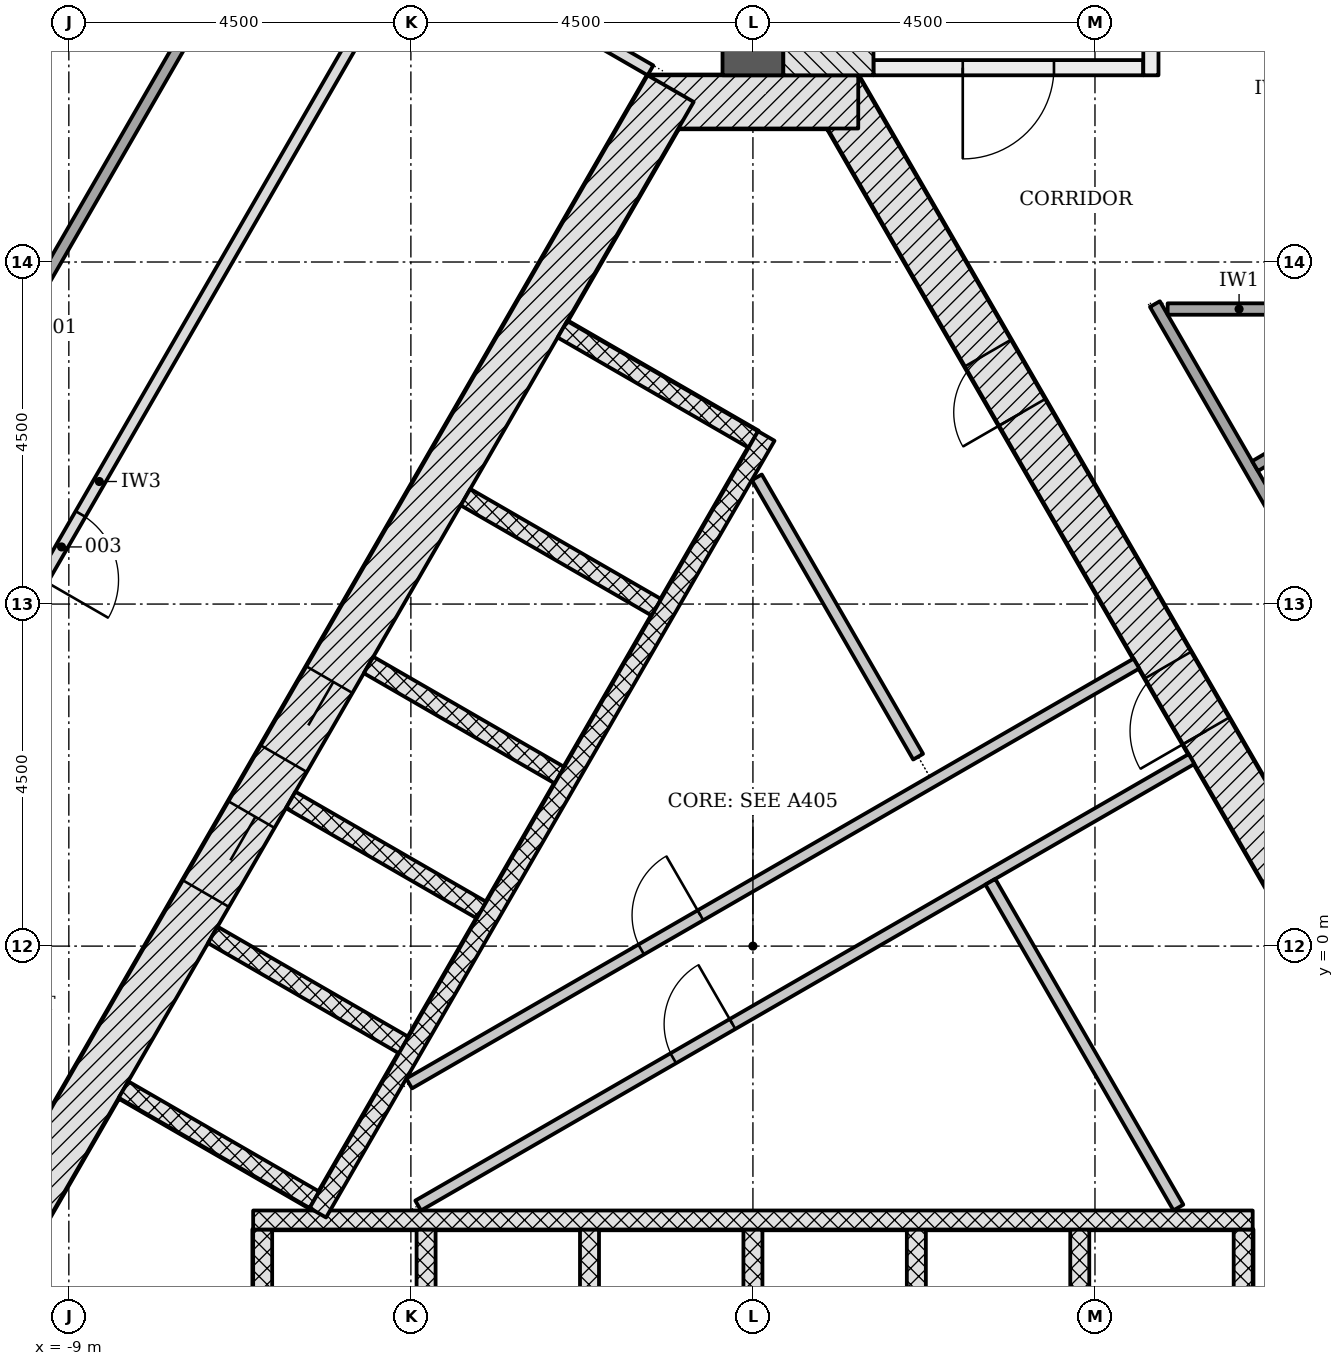
"""IFC4 building model, lengths in metres.
Left out: names, types, materials, properties, quantities, classifications, styles, units other than length and angle.
Written with IfcOpenShell. Run it as: python <this file> out.ifc"""

import sys

from ifc_helpers import new_model, si_unit, direction, frame, frame_2d, origin, place, context, subcontext, project, spatial, rectangle, extrude, element, fill, save


model = new_model("IFC4")
c1 = context("Model", 3, precision=1e-05, world=origin(), true_north=direction((0.0, 1.0)))
c2 = subcontext(c1, "Body", "Model", "MODEL_VIEW")
j1 = project(units=[si_unit("LENGTHUNIT", "METRE"), si_unit("PLANEANGLEUNIT", "RADIAN")], contexts=[c1])
p1 = place(None, origin())
s1 = spatial("IfcSite", under=j1, at=p1, CompositionType="ELEMENT")
p2 = place(p1, origin())
s2 = spatial("IfcBuilding", under=s1, at=p2, CompositionType="ELEMENT")
p3 = place(p2, frame((0.0, 0.0, 91.5)))
s3 = spatial("IfcBuildingStorey", under=s2, at=p3, CompositionType="ELEMENT", Elevation=91.5)
p4 = place(p3, frame((10.311, -4.703, -0.2), z_axis=(0.0, 0.0, 1.0), x_axis=(-0.500001446645, 0.866024568562, 0.0)))
e1 = element("IfcWall", 1, at=p4, inside=s3, PredefinedType="SHEAR", context=c2, shape_type="SweptSolid", body=[
    extrude(rectangle(XDim=18.458, YDim=0.7, at=frame_2d((9.229, 0.0))), origin(), (0.0, 0.0, 1.0), 3.6),
])
p5 = place(p4, frame((8.7, 0.0, 0.2)))
e2 = element("IfcOpeningElement", 2, at=p5, cuts=e1, PredefinedType="OPENING", context=c2, shape_type="SweptSolid", body=[
    extrude(rectangle(XDim=1.0, YDim=2.1, at=frame_2d((0.5, 1.05))), frame((0.0, 0.36, 0.0), z_axis=(0.0, -1.0, 0.0), x_axis=(1.0, 0.0, 0.0)), (0.0, 0.0, 1.0), 0.72),
])
p6 = place(p4, frame((3.99, 0.0, 0.2)))
e3 = element("IfcOpeningElement", 3, at=p6, cuts=e1, PredefinedType="OPENING", context=c2, shape_type="SweptSolid", body=[
    extrude(rectangle(XDim=0.9, YDim=2.1, at=frame_2d((0.45, 1.05))), frame((0.0, 0.36, 0.0), z_axis=(0.0, -1.0, 0.0), x_axis=(1.0, 0.0, 0.0)), (0.0, 0.0, 1.0), 0.72),
])
p7 = place(p4, frame((13.539, 0.0, 0.2)))
e4 = element("IfcOpeningElement", 4, at=p7, cuts=e1, PredefinedType="OPENING", context=c2, shape_type="SweptSolid", body=[
    extrude(rectangle(XDim=0.9, YDim=2.1, at=frame_2d((0.45, 1.05))), frame((0.0, 0.36, 0.0), z_axis=(0.0, -1.0, 0.0), x_axis=(1.0, 0.0, 0.0)), (0.0, 0.0, 1.0), 0.72),
])
p8 = place(p3, frame((1.386, 11.106, -0.2), z_axis=(0.0, 0.0, 1.0), x_axis=(-1.0, 0.0, 0.0)))
e5 = element("IfcWall", 5, at=p8, inside=s3, PredefinedType="SHEAR", context=c2, shape_type="SweptSolid", body=[
    extrude(rectangle(XDim=2.771, YDim=0.7, at=frame_2d((1.386, 0.0))), origin(), (0.0, 0.0, 1.0), 3.6),
])
p9 = place(p3, frame((-1.083, 11.281, -0.2), z_axis=(0.0, 0.0, 1.0), x_axis=(-0.500001446645, -0.866024568562, 0.0)))
e6 = element("IfcWall", 6, at=p9, inside=s3, PredefinedType="SHEAR", context=c2, shape_type="SweptSolid", body=[
    extrude(rectangle(XDim=18.458, YDim=0.7, at=frame_2d((9.229, 0.0))), origin(), (0.0, 0.0, 1.0), 3.6),
])
p10 = place(p9, frame((8.979, 0.0, 0.2)))
e7 = element("IfcOpeningElement", 7, at=p10, cuts=e6, PredefinedType="OPENING", context=c2, shape_type="SweptSolid", body=[
    extrude(rectangle(XDim=1.2, YDim=2.1, at=frame_2d((0.6, 1.05))), frame((0.0, 0.36, 0.0), z_axis=(0.0, -1.0, 0.0), x_axis=(1.0, 0.0, 0.0)), (0.0, 0.0, 1.0), 0.72),
])
p11 = place(p9, frame((11.029, 0.0, 0.2)))
e8 = element("IfcOpeningElement", 8, at=p11, cuts=e6, PredefinedType="OPENING", context=c2, shape_type="SweptSolid", body=[
    extrude(rectangle(XDim=1.2, YDim=2.1, at=frame_2d((0.6, 1.05))), frame((0.0, 0.36, 0.0), z_axis=(0.0, -1.0, 0.0), x_axis=(1.0, 0.0, 0.0)), (0.0, 0.0, 1.0), 0.72),
])
p12 = place(p3, frame((-10.311, -4.353, -0.2), z_axis=(0.0, 0.0, 1.0), x_axis=(0.500042739161, -0.866000726912, 0.0)))
e9 = element("IfcWall", 9, at=p12, inside=s3, PredefinedType="SHEAR", context=c2, shape_type="SweptSolid", body=[
    extrude(rectangle(XDim=2.771, YDim=0.7, at=frame_2d((1.386, 0.0))), origin(), (0.0, 0.0, 1.0), 3.6),
])
p13 = place(p3, frame((0.0, 11.456, -0.2), z_axis=(0.0, 0.0, 1.0), x_axis=(0.0, 1.0, 0.0)))
e10 = element("IfcWall", 10, at=p13, inside=s3, PredefinedType="SHEAR", context=c2, shape_type="SweptSolid", body=[
    extrude(rectangle(XDim=12.678, YDim=0.8, at=frame_2d((6.339, 0.0))), origin(), (0.0, 0.0, 1.0), 3.6),
])
for number, where, z_axis, x_axis in (
    (11, (-6.45, -6.228, -0.2), (0.0, 0.0, 1.0), (0.0, 1.0, 0.0)),
    (12, (-4.3, -6.228, -0.2), (0.0, 0.0, 1.0), (0.0, 1.0, 0.0)),
    (13, (-2.15, -6.228, -0.2), (0.0, 0.0, 1.0), (0.0, 1.0, 0.0)),
    (14, (0.0, -6.228, -0.2), (0.0, 0.0, 1.0), (0.0, 1.0, 0.0)),
    (15, (2.15, -6.228, -0.2), (0.0, 0.0, 1.0), (0.0, 1.0, 0.0)),
    (16, (4.3, -6.228, -0.2), (0.0, 0.0, 1.0), (0.0, 1.0, 0.0)),
    (17, (6.45, -6.228, -0.2), (0.0, 0.0, 1.0), (0.0, 1.0, 0.0)),
):
    element("IfcWall", number, at=place(p3, frame(where, z_axis=z_axis, x_axis=x_axis)), inside=s3, PredefinedType="PARTITIONING", context=c2, shape_type="SweptSolid", body=[
        extrude(rectangle(XDim=2.5, YDim=0.25, at=frame_2d((1.25, 0.0))), origin(), (0.0, 0.0, 1.0), 3.6),
    ])
p14 = place(p3, frame((-6.575, -3.603, 0.0), z_axis=(0.0, 0.0, 1.0), x_axis=(1.0, 0.0, 0.0)))
e18 = element("IfcWall", 18, at=p14, inside=s3, PredefinedType="PARTITIONING", context=c2, shape_type="SweptSolid", body=[
    extrude(rectangle(XDim=13.15, YDim=0.25, at=frame_2d((6.575, 0.0))), origin(), (0.0, 0.0, 1.0), 3.4),
])
p15 = place(p3, frame((-2.506, 8.115, -0.2), z_axis=(0.0, 0.0, 1.0), x_axis=(0.865996321171, -0.50005036918, 0.0)))
e19 = element("IfcWall", 19, at=p15, inside=s3, PredefinedType="PARTITIONING", context=c2, shape_type="SweptSolid", body=[
    extrude(rectangle(XDim=2.9, YDim=0.25, at=frame_2d((1.45, 0.0))), origin(), (0.0, 0.0, 1.0), 3.6),
])
for number, where, z_axis, x_axis in (
    (20, (-3.781, 5.907, -0.2), (0.0, 0.0, 1.0), (0.866, -0.5, 0.0)),
    (21, (-5.056, 3.699, -0.2), (0.0, 0.0, 1.0), (0.866, -0.5, 0.0)),
    (22, (-6.081, 1.923, -0.2), (0.0, 0.0, 1.0), (0.866, -0.5, 0.0)),
    (23, (-7.106, 0.148, -0.2), (0.0, 0.0, 1.0), (0.866, -0.5, 0.0)),
    (24, (-8.281, -1.887, -0.2), (0.0, 0.0, 1.0), (0.866, -0.5, 0.0)),
):
    element("IfcWall", number, at=place(p3, frame(where, z_axis=z_axis, x_axis=x_axis)), inside=s3, PredefinedType="PARTITIONING", context=c2, shape_type="SweptSolid", body=[
        extrude(rectangle(XDim=2.9, YDim=0.25, at=frame_2d((1.45, 0.0))), origin(), (0.0, 0.0, 1.0), 3.6),
    ])
p16 = place(p3, frame((0.176, 6.711, 0.0), z_axis=(0.0, 0.0, 1.0), x_axis=(-0.500004227369, -0.866022963098, 0.0)))
e25 = element("IfcWall", 25, at=p16, inside=s3, PredefinedType="PARTITIONING", context=c2, shape_type="SweptSolid", body=[
    extrude(rectangle(XDim=11.8, YDim=0.25, at=frame_2d((5.9, 0.0))), origin(), (0.0, 0.0, 1.0), 3.4),
])
p17 = place(p3, frame((-4.523, -1.807, 0.0), z_axis=(0.0, 0.0, 1.0), x_axis=(0.866030300338, 0.499991518824, 0.0)))
e26 = element("IfcWall", 26, at=p17, inside=s3, PredefinedType="PARTITIONING", context=c2, shape_type="SweptSolid", body=[
    extrude(rectangle(XDim=11.049, YDim=0.15, at=frame_2d((5.524, 0.0))), origin(), (0.0, 0.0, 1.0), 3.4),
])
p18 = place(p17, frame((3.525, 0.0, 0.0)))
e27 = element("IfcOpeningElement", 27, at=p18, cuts=e26, PredefinedType="OPENING", context=c2, shape_type="SweptSolid", body=[
    extrude(rectangle(XDim=0.9, YDim=2.1, at=frame_2d((0.45, 1.05))), frame((0.0, 0.085, 0.0), z_axis=(0.0, -1.0, 0.0), x_axis=(1.0, 0.0, 0.0)), (0.0, 0.0, 1.0), 0.17),
])
p19 = place(p3, frame((-4.404, -3.413, 0.0), z_axis=(0.0, 0.0, 1.0), x_axis=(0.866022252853, 0.500005457533, 0.0)))
e28 = element("IfcWall", 28, at=p19, inside=s3, PredefinedType="PARTITIONING", context=c2, shape_type="SweptSolid", body=[
    extrude(rectangle(XDim=11.749, YDim=0.15, at=frame_2d((5.875, 0.0))), origin(), (0.0, 0.0, 1.0), 3.4),
])
p20 = place(p19, frame((3.875, 0.0, 0.0)))
e29 = element("IfcOpeningElement", 29, at=p20, cuts=e28, PredefinedType="OPENING", context=c2, shape_type="SweptSolid", body=[
    extrude(rectangle(XDim=0.9, YDim=2.1, at=frame_2d((0.45, 1.05))), frame((0.0, 0.085, 0.0), z_axis=(0.0, -1.0, 0.0), x_axis=(1.0, 0.0, 0.0)), (0.0, 0.0, 1.0), 0.17),
])
p21 = place(p3, frame((2.174, 2.492, 0.0), z_axis=(0.0, 0.0, 1.0), x_axis=(-0.499999641798, 0.866025610592, 0.0)))
e30 = element("IfcWall", 30, at=p21, inside=s3, PredefinedType="PARTITIONING", context=c2, shape_type="SweptSolid", body=[
    extrude(rectangle(XDim=4.244, YDim=0.15, at=frame_2d((2.122, 0.0))), origin(), (0.0, 0.0, 1.0), 3.4),
])
p22 = place(p3, frame((5.598, -3.439, 0.0), z_axis=(0.0, 0.0, 1.0), x_axis=(-0.500007155043, 0.866021272779, 0.0)))
e31 = element("IfcWall", 31, at=p22, inside=s3, PredefinedType="PARTITIONING", context=c2, shape_type="SweptSolid", body=[
    extrude(rectangle(XDim=4.949, YDim=0.15, at=frame_2d((2.474, 0.0))), origin(), (0.0, 0.0, 1.0), 3.4),
])
p23 = place(p3, frame((5.135, 11.556, -0.2), z_axis=(0.0, 0.0, 1.0), x_axis=(-1.0, 0.0, 0.0)))
e32 = element("IfcWall", 32, at=p23, inside=s3, PredefinedType="SHEAR", context=c2, shape_type="SweptSolid", body=[
    extrude(rectangle(XDim=3.55, YDim=0.2, at=frame_2d((1.775, 0.0))), origin(), (0.0, 0.0, 1.0), 3.6),
])
p24 = place(p23, frame((1.175, 0.0, 0.2)))
e33 = element("IfcOpeningElement", 33, at=p24, cuts=e32, PredefinedType="OPENING", context=c2, shape_type="SweptSolid", body=[
    extrude(rectangle(XDim=1.2, YDim=2.1, at=frame_2d((0.6, 1.05))), frame((0.0, 0.11, 0.0), z_axis=(0.0, -1.0, 0.0), x_axis=(1.0, 0.0, 0.0)), (0.0, 0.0, 1.0), 0.22),
])
p25 = place(p3, frame((5.236, 11.456, -0.2), z_axis=(0.0, 0.0, 1.0), x_axis=(0.0, 1.0, 0.0)))
e34 = element("IfcWall", 34, at=p25, inside=s3, PredefinedType="SHEAR", context=c2, shape_type="SweptSolid", body=[
    extrude(rectangle(XDim=5.6, YDim=0.2, at=frame_2d((2.8, 0.0))), origin(), (0.0, 0.0, 1.0), 3.6),
])
p26 = place(p25, frame((0.45, 0.0, 0.2)))
e35 = element("IfcOpeningElement", 35, at=p26, cuts=e34, PredefinedType="OPENING", context=c2, shape_type="SweptSolid", body=[
    extrude(rectangle(XDim=1.2, YDim=2.1, at=frame_2d((0.6, 1.05))), frame((0.0, 0.11, 0.0), z_axis=(0.0, -1.0, 0.0), x_axis=(1.0, 0.0, 0.0)), (0.0, 0.0, 1.0), 0.22),
])
p27 = place(p3, frame((0.993, 11.456, -0.2), z_axis=(0.0, 0.0, 1.0), x_axis=(0.0, 1.0, 0.0)))
e36 = element("IfcWall", 36, at=p27, inside=s3, PredefinedType="SHEAR", context=c2, shape_type="SweptSolid", body=[
    extrude(rectangle(XDim=7.2, YDim=1.186, at=frame_2d((3.6, 0.0))), origin(), (0.0, 0.0, 1.0), 3.6),
])
p28 = place(p3, frame((-16.169, -3.099, 0.0), z_axis=(0.0, 0.0, 1.0), x_axis=(0.499999805269, 0.866025516212, 0.0)))
e37 = element("IfcWall", 37, at=p28, inside=s3, PredefinedType="PARTITIONING", context=c2, shape_type="SweptSolid", body=[
    extrude(rectangle(XDim=22.097, YDim=0.15, at=frame_2d((11.049, 0.0))), origin(), (0.0, 0.0, 1.0), 2.778),
])
p29 = place(p28, frame((12.221, 0.0, 0.0)))
e38 = element("IfcOpeningElement", 38, at=p29, cuts=e37, PredefinedType="OPENING", context=c2, shape_type="SweptSolid", body=[
    extrude(rectangle(XDim=1.5, YDim=2.1, at=frame_2d((0.75, 1.05))), frame((0.0, 0.085, 0.0), z_axis=(0.0, -1.0, 0.0), x_axis=(1.0, 0.0, 0.0)), (0.0, 0.0, 1.0), 0.17),
])
p30 = place(p28, frame((3.403, 0.0, 0.0)))
e39 = element("IfcOpeningElement", 39, at=p30, cuts=e37, PredefinedType="OPENING", context=c2, shape_type="SweptSolid", body=[
    extrude(rectangle(XDim=1.5, YDim=2.1, at=frame_2d((0.75, 1.05))), frame((0.0, 0.085, 0.0), z_axis=(0.0, -1.0, 0.0), x_axis=(1.0, 0.0, 0.0)), (0.0, 0.0, 1.0), 0.17),
])
p31 = place(p3, frame((-4.407, 13.374, 0.0), z_axis=(0.0, 0.0, 1.0), x_axis=(-0.499997181693, -0.866027030928, 0.0)))
e40 = element("IfcWall", 40, at=p31, inside=s3, PredefinedType="PARTITIONING", context=c2, shape_type="SweptSolid", body=[
    extrude(rectangle(XDim=16.77, YDim=0.15, at=frame_2d((8.385, 0.0))), origin(), (0.0, 0.0, 1.0), 2.778),
])
p32 = place(p31, frame((8.879, 0.0, 0.0)))
e41 = element("IfcOpeningElement", 41, at=p32, cuts=e40, PredefinedType="OPENING", context=c2, shape_type="SweptSolid", body=[
    extrude(rectangle(XDim=1.0, YDim=2.1, at=frame_2d((0.5, 1.05))), frame((0.0, 0.085, 0.0), z_axis=(0.0, -1.0, 0.0), x_axis=(1.0, 0.0, 0.0)), (0.0, 0.0, 1.0), 0.17),
])
p33 = place(p3, frame((5.289, 8.446, 0.0), z_axis=(0.0, 0.0, 1.0), x_axis=(0.499996620721, -0.866027354803, 0.0)))
e42 = element("IfcWall", 42, at=p33, inside=s3, PredefinedType="PARTITIONING", context=c2, shape_type="SweptSolid", body=[
    extrude(rectangle(XDim=15.057, YDim=0.15, at=frame_2d((7.528, 0.0))), origin(), (0.0, 0.0, 1.0), 2.778),
])
p34 = place(p33, frame((12.566, 0.0, 0.0)))
e43 = element("IfcOpeningElement", 43, at=p34, cuts=e42, PredefinedType="OPENING", context=c2, shape_type="SweptSolid", body=[
    extrude(rectangle(XDim=1.0, YDim=2.1, at=frame_2d((0.5, 1.05))), frame((0.0, 0.085, 0.0), z_axis=(0.0, -1.0, 0.0), x_axis=(1.0, 0.0, 0.0)), (0.0, 0.0, 1.0), 0.17),
])
p35 = place(p33, frame((9.395, 0.0, 0.0)))
e44 = element("IfcOpeningElement", 44, at=p35, cuts=e42, PredefinedType="OPENING", context=c2, shape_type="SweptSolid", body=[
    extrude(rectangle(XDim=1.0, YDim=2.1, at=frame_2d((0.5, 1.05))), frame((0.0, 0.085, 0.0), z_axis=(0.0, -1.0, 0.0), x_axis=(1.0, 0.0, 0.0)), (0.0, 0.0, 1.0), 0.17),
])
p36 = place(p33, frame((6.845, 0.0, 0.0)))
e45 = element("IfcOpeningElement", 45, at=p36, cuts=e42, PredefinedType="OPENING", context=c2, shape_type="SweptSolid", body=[
    extrude(rectangle(XDim=1.0, YDim=2.1, at=frame_2d((0.5, 1.05))), frame((0.0, 0.085, 0.0), z_axis=(0.0, -1.0, 0.0), x_axis=(1.0, 0.0, 0.0)), (0.0, 0.0, 1.0), 0.17),
])
p37 = place(p33, frame((3.537, 0.0, 0.0)))
e46 = element("IfcOpeningElement", 46, at=p37, cuts=e42, PredefinedType="OPENING", context=c2, shape_type="SweptSolid", body=[
    extrude(rectangle(XDim=1.5, YDim=2.1, at=frame_2d((0.75, 1.05))), frame((0.0, 0.085, 0.0), z_axis=(0.0, -1.0, 0.0), x_axis=(1.0, 0.0, 0.0)), (0.0, 0.0, 1.0), 0.17),
])
p38 = place(p3, frame((-4.379, 13.271, 0.0), z_axis=(0.0, 0.0, 1.0), x_axis=(0.866019471182, -0.500010275428, 0.0)))
e47 = element("IfcWall", 47, at=p38, inside=s3, PredefinedType="PARTITIONING", context=c2, shape_type="SweptSolid", body=[
    extrude(rectangle(XDim=3.5, YDim=0.15, at=frame_2d((1.75, 0.0))), origin(), (0.0, 0.0, 1.0), 3.4),
])
p39 = place(p3, frame((5.456, 8.381, 0.0), z_axis=(0.0, 0.0, 1.0), x_axis=(1.0, 0.0, 0.0)))
e48 = element("IfcWall", 48, at=p39, inside=s3, PredefinedType="PARTITIONING", context=c2, shape_type="SweptSolid", body=[
    extrude(rectangle(XDim=1.88, YDim=0.15, at=frame_2d((0.94, 0.0))), origin(), (0.0, 0.0, 1.0), 3.4),
])
p40 = place(p3, frame((13.269, 10.25, 0.0), z_axis=(0.0, 0.0, 1.0), x_axis=(-0.861057776749, -0.508507133775, 0.0)))
e49 = element("IfcWall", 49, at=p40, inside=s3, PredefinedType="PARTITIONING", context=c2, shape_type="SweptSolid", body=[
    extrude(rectangle(XDim=7.738, YDim=0.15, at=frame_2d((3.869, 0.0))), origin(), (0.0, 0.0, 1.0), 2.778),
])
p41 = place(p10, origin())
e50 = element("IfcDoor", 50, at=p41, inside=s3, OperationType="DOUBLE_DOOR_SLIDING", PredefinedType="DOOR", context=c2, shape_type="SweptSolid", body=[
    extrude(rectangle(XDim=1.2, YDim=2.1, at=frame_2d((0.6, 1.05))), frame((0.0, 0.025, 0.0), z_axis=(0.0, -1.0, 0.0), x_axis=(1.0, 0.0, 0.0)), (0.0, 0.0, 1.0), 0.05),
])
fill(e7, e50)
p42 = place(p11, origin())
e51 = element("IfcDoor", 51, at=p42, inside=s3, OperationType="DOUBLE_DOOR_SLIDING", PredefinedType="DOOR", context=c2, shape_type="SweptSolid", body=[
    extrude(rectangle(XDim=1.2, YDim=2.1, at=frame_2d((0.6, 1.05))), frame((0.0, 0.025, 0.0), z_axis=(0.0, -1.0, 0.0), x_axis=(1.0, 0.0, 0.0)), (0.0, 0.0, 1.0), 0.05),
])
fill(e8, e51)
p43 = place(p5, origin())
e52 = element("IfcDoor", 52, at=p43, inside=s3, OperationType="SINGLE_SWING_LEFT", PredefinedType="DOOR", context=c2, shape_type="SweptSolid", body=[
    extrude(rectangle(XDim=1.0, YDim=2.1, at=frame_2d((0.5, 1.05))), frame((0.0, 0.075, 0.0), z_axis=(0.0, -1.0, 0.0), x_axis=(1.0, 0.0, 0.0)), (0.0, 0.0, 1.0), 0.15),
])
fill(e2, e52)
p44 = place(p7, origin())
e53 = element("IfcDoor", 53, at=p44, inside=s3, OperationType="SINGLE_SWING_LEFT", PredefinedType="DOOR", context=c2, shape_type="SweptSolid", body=[
    extrude(rectangle(XDim=0.9, YDim=2.1, at=frame_2d((0.45, 1.05))), frame((0.0, 0.075, 0.0), z_axis=(0.0, -1.0, 0.0), x_axis=(1.0, 0.0, 0.0)), (0.0, 0.0, 1.0), 0.15),
])
fill(e4, e53)
p45 = place(p20, origin())
e54 = element("IfcDoor", 54, at=p45, inside=s3, OperationType="SINGLE_SWING_RIGHT", PredefinedType="DOOR", context=c2, shape_type="SweptSolid", body=[
    extrude(rectangle(XDim=0.9, YDim=2.1, at=frame_2d((0.45, 1.05))), frame((0.0, 0.025, 0.0), z_axis=(0.0, -1.0, 0.0), x_axis=(1.0, 0.0, 0.0)), (0.0, 0.0, 1.0), 0.05),
])
fill(e29, e54)
p46 = place(p18, origin())
e55 = element("IfcDoor", 55, at=p46, inside=s3, OperationType="SINGLE_SWING_RIGHT", PredefinedType="DOOR", context=c2, shape_type="SweptSolid", body=[
    extrude(rectangle(XDim=0.9, YDim=2.1, at=frame_2d((0.45, 1.05))), frame((0.0, 0.025, 0.0), z_axis=(0.0, -1.0, 0.0), x_axis=(1.0, 0.0, 0.0)), (0.0, 0.0, 1.0), 0.05),
])
fill(e27, e55)
p47 = place(p24, origin())
e56 = element("IfcDoor", 56, at=p47, inside=s3, OperationType="SINGLE_SWING_RIGHT", PredefinedType="DOOR", context=c2, shape_type="SweptSolid", body=[
    extrude(rectangle(XDim=1.2, YDim=2.1, at=frame_2d((0.6, 1.05))), frame((0.0, 0.025, 0.0), z_axis=(0.0, -1.0, 0.0), x_axis=(1.0, 0.0, 0.0)), (0.0, 0.0, 1.0), 0.05),
])
fill(e33, e56)
p48 = place(p32, origin())
e57 = element("IfcDoor", 57, at=p48, inside=s3, OperationType="SINGLE_SWING_RIGHT", PredefinedType="DOOR", context=c2, shape_type="SweptSolid", body=[
    extrude(rectangle(XDim=1.0, YDim=2.1, at=frame_2d((0.5, 1.05))), frame((0.0, 0.025, 0.0), z_axis=(0.0, -1.0, 0.0), x_axis=(1.0, 0.0, 0.0)), (0.0, 0.0, 1.0), 0.05),
])
fill(e41, e57)
save(model, sys.argv[1])
